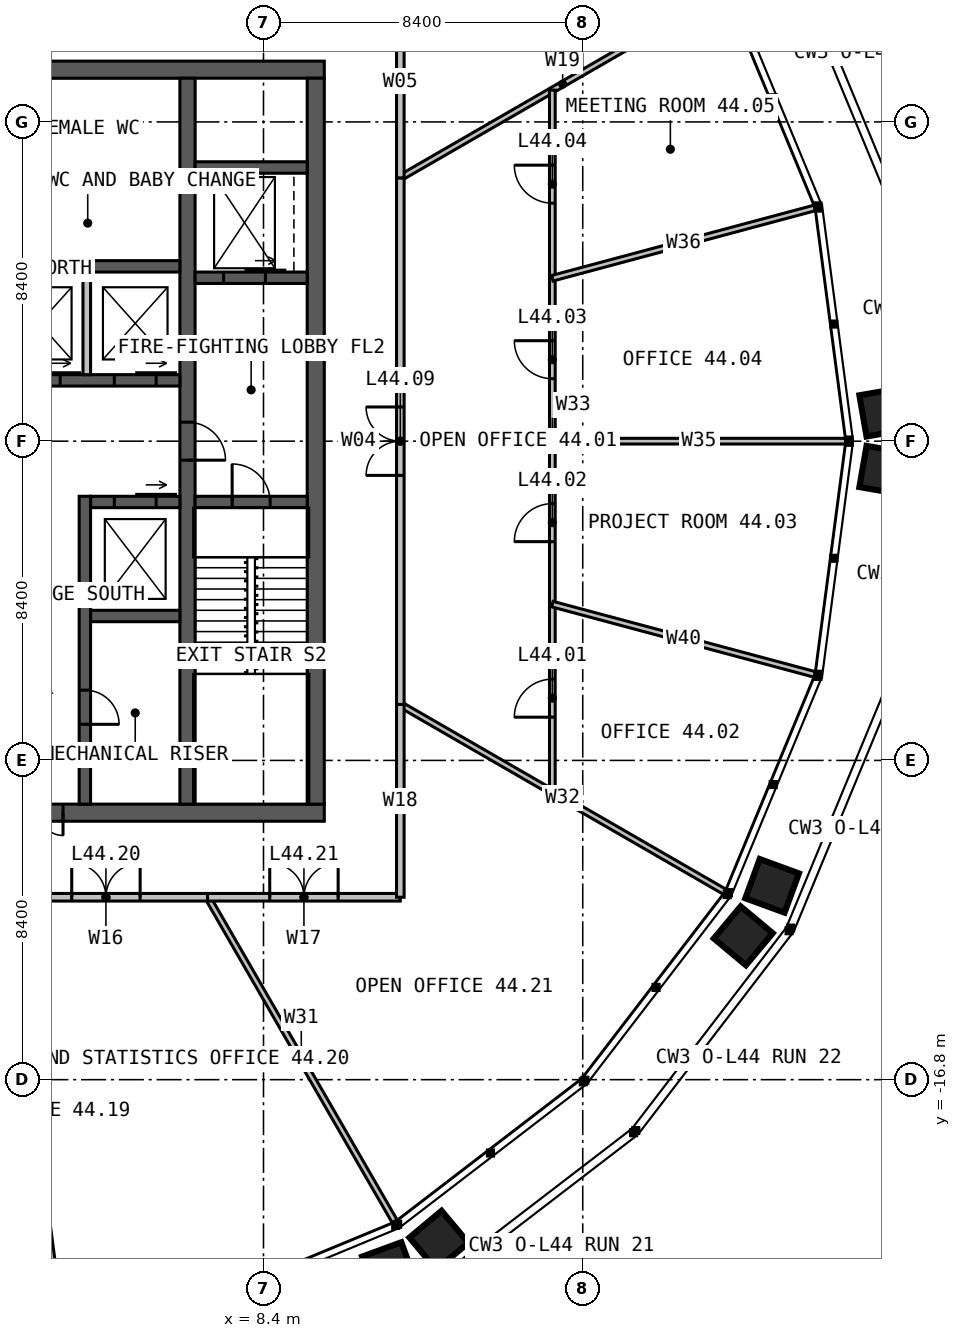
"""IFC4 building model, lengths in metres.
Left out: names, types, materials, properties, quantities, classifications, styles, units other than length and angle.
Written with IfcOpenShell. Run it as: python <this file> out.ifc"""

import sys

from ifc_helpers import new_model, si_unit, direction, frame, frame_2d, origin, place, context, subcontext, project, spatial, rectangle, extrude, element, fill, save


model = new_model("IFC4")
c1 = context("Model", 3, precision=1e-05, world=origin(), true_north=direction((0.0, 1.0)))
c2 = subcontext(c1, "Body", "Model", "MODEL_VIEW")
j1 = project(units=[si_unit("LENGTHUNIT", "METRE"), si_unit("PLANEANGLEUNIT", "RADIAN")], contexts=[c1])
p1 = place(None, origin())
s1 = spatial("IfcSite", under=j1, at=p1, CompositionType="ELEMENT")
p2 = place(p1, origin())
s2 = spatial("IfcBuilding", under=s1, at=p2, CompositionType="ELEMENT")
p3 = place(p2, frame((0.0, 0.0, 183.0)))
s3 = spatial("IfcBuildingStorey", under=s2, at=p3, CompositionType="ELEMENT", Elevation=183.0)
p4 = place(p3, frame((-10.0, 9.775, 0.0), z_axis=(0.0, 0.0, 1.0), x_axis=(1.0, 0.0, 0.0)))
e1 = element("IfcWall", 1, at=p4, inside=s3, PredefinedType="SOLIDWALL", context=c2, shape_type="SweptSolid", body=[
    extrude(rectangle(XDim=20.0, YDim=0.45, at=frame_2d((10.0, 0.0))), origin(), (0.0, 0.0, 1.0), 4.0),
])
p5 = place(p4, frame((9.4, 0.0, 0.0)))
e2 = element("IfcOpeningElement", 2, at=p5, cuts=e1, PredefinedType="OPENING", context=c2, shape_type="SweptSolid", body=[
    extrude(rectangle(XDim=1.2, YDim=2.2, at=frame_2d((0.6, 1.1))), frame((0.0, 0.235, 0.0), z_axis=(0.0, -1.0, 0.0), x_axis=(1.0, 0.0, 0.0)), (0.0, 0.0, 1.0), 0.47),
])
p6 = place(p3, frame((10.0, -9.775, 0.0), z_axis=(0.0, 0.0, 1.0), x_axis=(-1.0, 0.0, 0.0)))
e3 = element("IfcWall", 3, at=p6, inside=s3, PredefinedType="SOLIDWALL", context=c2, shape_type="SweptSolid", body=[
    extrude(rectangle(XDim=20.0, YDim=0.45, at=frame_2d((10.0, 0.0))), origin(), (0.0, 0.0, 1.0), 4.0),
])
p7 = place(p6, frame((6.875, 0.0, 0.0)))
e4 = element("IfcOpeningElement", 4, at=p7, cuts=e3, PredefinedType="OPENING", context=c2, shape_type="SweptSolid", body=[
    extrude(rectangle(XDim=1.2, YDim=2.2, at=frame_2d((0.6, 1.1))), frame((0.0, 0.235, 0.0), z_axis=(0.0, -1.0, 0.0), x_axis=(1.0, 0.0, 0.0)), (0.0, 0.0, 1.0), 0.47),
])
p8 = place(p3, frame((9.775, -9.55, 0.0), z_axis=(0.0, 0.0, 1.0), x_axis=(0.0, 1.0, 0.0)))
e5 = element("IfcWall", 5, at=p8, inside=s3, PredefinedType="SOLIDWALL", context=c2, shape_type="SweptSolid", body=[
    extrude(rectangle(XDim=19.1, YDim=0.45, at=frame_2d((9.55, 0.0))), origin(), (0.0, 0.0, 1.0), 4.0),
])
p9 = place(p3, frame((6.4, 9.55, 0.0), z_axis=(0.0, 0.0, 1.0), x_axis=(0.0, -1.0, 0.0)))
e6 = element("IfcWall", 6, at=p9, inside=s3, PredefinedType="SOLIDWALL", context=c2, shape_type="SweptSolid", body=[
    extrude(rectangle(XDim=19.1, YDim=0.4, at=frame_2d((9.55, 0.0))), origin(), (0.0, 0.0, 1.0), 4.0),
])
p10 = place(p9, frame((9.05, 0.0, 0.0)))
e7 = element("IfcOpeningElement", 7, at=p10, cuts=e6, PredefinedType="OPENING", context=c2, shape_type="SweptSolid", body=[
    extrude(rectangle(XDim=1.0, YDim=2.2, at=frame_2d((0.5, 1.1))), frame((0.0, 0.21, 0.0), z_axis=(0.0, -1.0, 0.0), x_axis=(1.0, 0.0, 0.0)), (0.0, 0.0, 1.0), 0.42),
])
p11 = place(p3, frame((1.35, 1.6, 0.0), z_axis=(0.0, 0.0, 1.0), x_axis=(1.0, 0.0, 0.0)))
e8 = element("IfcWall", 8, at=p11, inside=s3, PredefinedType="SOLIDWALL", context=c2, shape_type="SweptSolid", body=[
    extrude(rectangle(XDim=4.85, YDim=0.3, at=frame_2d((2.425, 0.0))), origin(), (0.0, 0.0, 1.0), 4.0),
])
p12 = place(p11, frame((0.6, 0.0, 0.0)))
e9 = element("IfcOpeningElement", 9, at=p12, cuts=e8, PredefinedType="OPENING", context=c2, shape_type="SweptSolid", body=[
    extrude(rectangle(XDim=1.1, YDim=2.2, at=frame_2d((0.55, 1.1))), frame((0.0, 0.16, 0.0), z_axis=(0.0, -1.0, 0.0), x_axis=(1.0, 0.0, 0.0)), (0.0, 0.0, 1.0), 0.32),
])
p13 = place(p11, frame((3.125, 0.0, 0.0)))
e10 = element("IfcOpeningElement", 10, at=p13, cuts=e8, PredefinedType="OPENING", context=c2, shape_type="SweptSolid", body=[
    extrude(rectangle(XDim=1.1, YDim=2.2, at=frame_2d((0.55, 1.1))), frame((0.0, 0.16, 0.0), z_axis=(0.0, -1.0, 0.0), x_axis=(1.0, 0.0, 0.0)), (0.0, 0.0, 1.0), 0.32),
])
p14 = place(p3, frame((1.35, 4.6, 0.0), z_axis=(0.0, 0.0, 1.0), x_axis=(1.0, 0.0, 0.0)))
e11 = element("IfcWall", 11, at=p14, inside=s3, PredefinedType="SOLIDWALL", context=c2, shape_type="SweptSolid", body=[
    extrude(rectangle(XDim=4.85, YDim=0.3, at=frame_2d((2.425, 0.0))), origin(), (0.0, 0.0, 1.0), 4.0),
])
p15 = place(p3, frame((3.85, -1.6, 0.0), z_axis=(0.0, 0.0, 1.0), x_axis=(1.0, 0.0, 0.0)))
e12 = element("IfcWall", 12, at=p15, inside=s3, PredefinedType="SOLIDWALL", context=c2, shape_type="SweptSolid", body=[
    extrude(rectangle(XDim=2.35, YDim=0.3, at=frame_2d((1.175, 0.0))), origin(), (0.0, 0.0, 1.0), 4.0),
])
p16 = place(p15, frame((0.625, 0.0, 0.0)))
e13 = element("IfcOpeningElement", 13, at=p16, cuts=e12, PredefinedType="OPENING", context=c2, shape_type="SweptSolid", body=[
    extrude(rectangle(XDim=1.1, YDim=2.2, at=frame_2d((0.55, 1.1))), frame((0.0, 0.16, 0.0), z_axis=(0.0, -1.0, 0.0), x_axis=(1.0, 0.0, 0.0)), (0.0, 0.0, 1.0), 0.32),
])
p17 = place(p3, frame((3.85, -4.6, 0.0), z_axis=(0.0, 0.0, 1.0), x_axis=(1.0, 0.0, 0.0)))
e14 = element("IfcWall", 14, at=p17, inside=s3, PredefinedType="SOLIDWALL", context=c2, shape_type="SweptSolid", body=[
    extrude(rectangle(XDim=2.35, YDim=0.3, at=frame_2d((1.175, 0.0))), origin(), (0.0, 0.0, 1.0), 4.0),
])
p18 = place(p3, frame((3.7, -1.45, 0.0), z_axis=(0.0, 0.0, 1.0), x_axis=(0.0, -1.0, 0.0)))
e15 = element("IfcWall", 15, at=p18, inside=s3, PredefinedType="SOLIDWALL", context=c2, shape_type="SweptSolid", body=[
    extrude(rectangle(XDim=8.1, YDim=0.3, at=frame_2d((4.05, 0.0))), origin(), (0.0, 0.0, 1.0), 4.0),
])
p19 = place(p18, frame((5.1, 0.0, 0.0)))
e16 = element("IfcOpeningElement", 16, at=p19, cuts=e15, PredefinedType="OPENING", context=c2, shape_type="SweptSolid", body=[
    extrude(rectangle(XDim=0.9, YDim=2.2, at=frame_2d((0.45, 1.1))), frame((0.0, 0.16, 0.0), z_axis=(0.0, -1.0, 0.0), x_axis=(1.0, 0.0, 0.0)), (0.0, 0.0, 1.0), 0.32),
])
p20 = place(p3, frame((6.6, -1.6, 0.0), z_axis=(0.0, 0.0, 1.0), x_axis=(1.0, 0.0, 0.0)))
e17 = element("IfcWall", 17, at=p20, inside=s3, PredefinedType="SOLIDWALL", context=c2, shape_type="SweptSolid", body=[
    extrude(rectangle(XDim=2.95, YDim=0.3, at=frame_2d((1.475, 0.0))), origin(), (0.0, 0.0, 1.0), 4.0),
])
p21 = place(p20, frame((0.975, 0.0, 0.0)))
e18 = element("IfcOpeningElement", 18, at=p21, cuts=e17, PredefinedType="OPENING", context=c2, shape_type="SweptSolid", body=[
    extrude(rectangle(XDim=1.0, YDim=2.2, at=frame_2d((0.5, 1.1))), frame((0.0, 0.16, 0.0), z_axis=(0.0, -1.0, 0.0), x_axis=(1.0, 0.0, 0.0)), (0.0, 0.0, 1.0), 0.32),
])
p22 = place(p3, frame((6.6, 4.3, 0.0), z_axis=(0.0, 0.0, 1.0), x_axis=(1.0, 0.0, 0.0)))
e19 = element("IfcWall", 19, at=p22, inside=s3, PredefinedType="SOLIDWALL", context=c2, shape_type="SweptSolid", body=[
    extrude(rectangle(XDim=2.95, YDim=0.3, at=frame_2d((1.475, 0.0))), origin(), (0.0, 0.0, 1.0), 4.0),
])
p23 = place(p22, frame((0.75, 0.0, 0.0)))
e20 = element("IfcOpeningElement", 20, at=p23, cuts=e19, PredefinedType="OPENING", context=c2, shape_type="SweptSolid", body=[
    extrude(rectangle(XDim=1.1, YDim=2.2, at=frame_2d((0.55, 1.1))), frame((0.0, 0.16, 0.0), z_axis=(0.0, -1.0, 0.0), x_axis=(1.0, 0.0, 0.0)), (0.0, 0.0, 1.0), 0.32),
])
p24 = place(p3, frame((6.6, 7.2, 0.0), z_axis=(0.0, 0.0, 1.0), x_axis=(1.0, 0.0, 0.0)))
e21 = element("IfcWall", 21, at=p24, inside=s3, PredefinedType="SOLIDWALL", context=c2, shape_type="SweptSolid", body=[
    extrude(rectangle(XDim=2.95, YDim=0.3, at=frame_2d((1.475, 0.0))), origin(), (0.0, 0.0, 1.0), 4.0),
])
p25 = place(p3, frame((3.75, 1.75, 0.0), z_axis=(0.0, 0.0, 1.0), x_axis=(0.0, 1.0, 0.0)))
e22 = element("IfcWall", 22, at=p25, inside=s3, PredefinedType="SOLIDWALL", context=c2, shape_type="SweptSolid", body=[
    extrude(rectangle(XDim=2.7, YDim=0.2, at=frame_2d((1.35, 0.0))), origin(), (0.0, 0.0, 1.0), 3.75),
])
p26 = place(p3, frame((1.35, 6.8, 0.0), z_axis=(0.0, 0.0, 1.0), x_axis=(1.0, 0.0, 0.0)))
e23 = element("IfcWall", 23, at=p26, inside=s3, PredefinedType="PARTITIONING", context=c2, shape_type="SweptSolid", body=[
    extrude(rectangle(XDim=4.85, YDim=0.15, at=frame_2d((2.425, 0.0))), origin(), (0.0, 0.0, 1.0), 3.75),
])
for number, where, z_axis, x_axis in (
    (24, (12.0, -6.928, 0.0), (0.0, 0.0, 1.0), (0.866, -0.5, 0.0)),
    (25, (12.0, 6.928, 0.0), (0.0, 0.0, 1.0), (0.866, 0.5, 0.0)),
):
    element("IfcWall", number, at=place(p3, frame(where, z_axis=z_axis, x_axis=x_axis)), inside=s3, PredefinedType="PARTITIONING", context=c2, shape_type="SweptSolid", body=[
        extrude(rectangle(XDim=9.865, YDim=0.15, at=frame_2d((4.932, 0.0))), origin(), (0.0, 0.0, 1.0), 2.79),
    ])
p27 = place(p3, frame((1.58, -12.0, 0.0), z_axis=(0.0, 0.0, 1.0), x_axis=(0.130531416064, -0.991444173628, 0.0)))
e26 = element("IfcWall", 26, at=p27, inside=s3, PredefinedType="PARTITIONING", context=c2, shape_type="SweptSolid", body=[
    extrude(rectangle(XDim=11.415, YDim=0.15, at=frame_2d((5.708, 0.0))), origin(), (0.0, 0.0, 1.0), 2.79),
])
p28 = place(p3, frame((6.928, -12.0, 0.0), z_axis=(0.0, 0.0, 1.0), x_axis=(0.49999595416, -0.866027739639, 0.0)))
e27 = element("IfcWall", 27, at=p28, inside=s3, PredefinedType="PARTITIONING", context=c2, shape_type="SweptSolid", body=[
    extrude(rectangle(XDim=9.865, YDim=0.15, at=frame_2d((4.932, 0.0))), origin(), (0.0, 0.0, 1.0), 2.79),
])
p29 = place(p3, frame((16.0, -9.238, 0.0), z_axis=(0.0, 0.0, 1.0), x_axis=(0.0, 1.0, 0.0)))
e28 = element("IfcWall", 28, at=p29, inside=s3, PredefinedType="PARTITIONING", context=c2, shape_type="SweptSolid", body=[
    extrude(rectangle(XDim=18.475, YDim=0.15, at=frame_2d((9.238, 0.0))), origin(), (0.0, 0.0, 1.0), 2.79),
])
p30 = place(p29, frame((1.975, 0.0, 0.0)))
e29 = element("IfcOpeningElement", 29, at=p30, cuts=e28, PredefinedType="OPENING", context=c2, shape_type="SweptSolid", body=[
    extrude(rectangle(XDim=1.0, YDim=2.2, at=frame_2d((0.5, 1.1))), frame((0.0, 0.085, 0.0), z_axis=(0.0, -1.0, 0.0), x_axis=(1.0, 0.0, 0.0)), (0.0, 0.0, 1.0), 0.17),
])
p31 = place(p29, frame((6.594, 0.0, 0.0)))
e30 = element("IfcOpeningElement", 30, at=p31, cuts=e28, PredefinedType="OPENING", context=c2, shape_type="SweptSolid", body=[
    extrude(rectangle(XDim=1.0, YDim=2.2, at=frame_2d((0.5, 1.1))), frame((0.0, 0.085, 0.0), z_axis=(0.0, -1.0, 0.0), x_axis=(1.0, 0.0, 0.0)), (0.0, 0.0, 1.0), 0.17),
])
p32 = place(p29, frame((10.881, 0.0, 0.0)))
e31 = element("IfcOpeningElement", 31, at=p32, cuts=e28, PredefinedType="OPENING", context=c2, shape_type="SweptSolid", body=[
    extrude(rectangle(XDim=1.0, YDim=2.2, at=frame_2d((0.5, 1.1))), frame((0.0, 0.085, 0.0), z_axis=(0.0, -1.0, 0.0), x_axis=(1.0, 0.0, 0.0)), (0.0, 0.0, 1.0), 0.17),
])
p33 = place(p29, frame((15.5, 0.0, 0.0)))
e32 = element("IfcOpeningElement", 32, at=p33, cuts=e28, PredefinedType="OPENING", context=c2, shape_type="SweptSolid", body=[
    extrude(rectangle(XDim=1.0, YDim=2.2, at=frame_2d((0.5, 1.1))), frame((0.0, 0.085, 0.0), z_axis=(0.0, -1.0, 0.0), x_axis=(1.0, 0.0, 0.0)), (0.0, 0.0, 1.0), 0.17),
])
p34 = place(p3, frame((16.0, -4.287, 0.0), z_axis=(0.0, 0.0, 1.0), x_axis=(0.965925667522, -0.25881963763, 0.0)))
e33 = element("IfcWall", 33, at=p34, inside=s3, PredefinedType="PARTITIONING", context=c2, shape_type="SweptSolid", body=[
    extrude(rectangle(XDim=7.157, YDim=0.15, at=frame_2d((3.578, 0.0))), origin(), (0.0, 0.0, 1.0), 2.79),
])
p35 = place(p3, frame((16.0, 0.0, 0.0), z_axis=(0.0, 0.0, 1.0), x_axis=(1.0, 0.0, 0.0)))
e34 = element("IfcWall", 34, at=p35, inside=s3, PredefinedType="PARTITIONING", context=c2, shape_type="SweptSolid", body=[
    extrude(rectangle(XDim=7.721, YDim=0.15, at=frame_2d((3.861, 0.0))), origin(), (0.0, 0.0, 1.0), 2.79),
])
p36 = place(p3, frame((16.0, 4.287, 0.0), z_axis=(0.0, 0.0, 1.0), x_axis=(0.965925667522, 0.25881963763, 0.0)))
e35 = element("IfcWall", 35, at=p36, inside=s3, PredefinedType="PARTITIONING", context=c2, shape_type="SweptSolid", body=[
    extrude(rectangle(XDim=7.157, YDim=0.15, at=frame_2d((3.578, 0.0))), origin(), (0.0, 0.0, 1.0), 2.79),
])
p37 = place(p3, frame((12.0, -6.928, 0.0), z_axis=(0.0, 0.0, 1.0), x_axis=(0.0, 1.0, 0.0)))
e36 = element("IfcWall", 36, at=p37, inside=s3, PredefinedType="PARTITIONING", context=c2, shape_type="SweptSolid", body=[
    extrude(rectangle(XDim=13.856, YDim=0.2, at=frame_2d((6.928, 0.0))), origin(), (0.0, 0.0, 1.0), 3.8),
])
p38 = place(p37, frame((6.028, 0.0, 0.0)))
e37 = element("IfcOpeningElement", 37, at=p38, cuts=e36, PredefinedType="OPENING", context=c2, shape_type="SweptSolid", body=[
    extrude(rectangle(XDim=1.8, YDim=2.2, at=frame_2d((0.9, 1.1))), frame((0.0, 0.11, 0.0), z_axis=(0.0, -1.0, 0.0), x_axis=(1.0, 0.0, 0.0)), (0.0, 0.0, 1.0), 0.22),
])
p39 = place(p3, frame((12.0, 6.928, 0.0), z_axis=(0.0, 0.0, 1.0), x_axis=(0.0, 1.0, 0.0)))
e38 = element("IfcWall", 38, at=p39, inside=s3, PredefinedType="PARTITIONING", context=c2, shape_type="SweptSolid", body=[
    extrude(rectangle(XDim=5.072, YDim=0.2, at=frame_2d((2.536, 0.0))), origin(), (0.0, 0.0, 1.0), 3.8),
])
p40 = place(p3, frame((1.58, -12.0, 0.0), z_axis=(0.0, 0.0, 1.0), x_axis=(1.0, 0.0, 0.0)))
e39 = element("IfcWall", 39, at=p40, inside=s3, PredefinedType="PARTITIONING", context=c2, shape_type="SweptSolid", body=[
    extrude(rectangle(XDim=5.348, YDim=0.2, at=frame_2d((2.674, 0.0))), origin(), (0.0, 0.0, 1.0), 3.8),
])
p41 = place(p40, frame((1.774, 0.0, 0.0)))
e40 = element("IfcOpeningElement", 40, at=p41, cuts=e39, PredefinedType="OPENING", context=c2, shape_type="SweptSolid", body=[
    extrude(rectangle(XDim=1.8, YDim=2.2, at=frame_2d((0.9, 1.1))), frame((0.0, 0.11, 0.0), z_axis=(0.0, -1.0, 0.0), x_axis=(1.0, 0.0, 0.0)), (0.0, 0.0, 1.0), 0.22),
])
p42 = place(p3, frame((6.928, -12.0, 0.0), z_axis=(0.0, 0.0, 1.0), x_axis=(1.0, 0.0, 0.0)))
e41 = element("IfcWall", 41, at=p42, inside=s3, PredefinedType="PARTITIONING", context=c2, shape_type="SweptSolid", body=[
    extrude(rectangle(XDim=5.072, YDim=0.2, at=frame_2d((2.536, 0.0))), origin(), (0.0, 0.0, 1.0), 3.8),
])
p43 = place(p42, frame((1.636, 0.0, 0.0)))
e42 = element("IfcOpeningElement", 42, at=p43, cuts=e41, PredefinedType="OPENING", context=c2, shape_type="SweptSolid", body=[
    extrude(rectangle(XDim=1.8, YDim=2.2, at=frame_2d((0.9, 1.1))), frame((0.0, 0.11, 0.0), z_axis=(0.0, -1.0, 0.0), x_axis=(1.0, 0.0, 0.0)), (0.0, 0.0, 1.0), 0.22),
])
p44 = place(p3, frame((12.0, -12.0, 0.0), z_axis=(0.0, 0.0, 1.0), x_axis=(0.0, 1.0, 0.0)))
e43 = element("IfcWall", 43, at=p44, inside=s3, PredefinedType="PARTITIONING", context=c2, shape_type="SweptSolid", body=[
    extrude(rectangle(XDim=5.072, YDim=0.2, at=frame_2d((2.536, 0.0))), origin(), (0.0, 0.0, 1.0), 3.8),
])
p45 = place(p7, origin())
e44 = element("IfcDoor", 44, at=p45, inside=s3, OperationType="DOUBLE_DOOR_SINGLE_SWING", PredefinedType="DOOR", context=c2, shape_type="SweptSolid", body=[
    extrude(rectangle(XDim=1.2, YDim=2.2, at=frame_2d((0.6, 1.1))), frame((0.0, 0.025, 0.0), z_axis=(0.0, -1.0, 0.0), x_axis=(1.0, 0.0, 0.0)), (0.0, 0.0, 1.0), 0.05),
])
fill(e4, e44)
p46 = place(p10, origin())
e45 = element("IfcDoor", 45, at=p46, inside=s3, OperationType="SINGLE_SWING_RIGHT", PredefinedType="DOOR", context=c2, shape_type="SweptSolid", body=[
    extrude(rectangle(XDim=1.0, YDim=2.2, at=frame_2d((0.5, 1.1))), frame((0.0, 0.025, 0.0), z_axis=(0.0, -1.0, 0.0), x_axis=(1.0, 0.0, 0.0)), (0.0, 0.0, 1.0), 0.05),
])
fill(e7, e45)
p47 = place(p21, origin())
e46 = element("IfcDoor", 46, at=p47, inside=s3, OperationType="SINGLE_SWING_LEFT", PredefinedType="DOOR", context=c2, shape_type="SweptSolid", body=[
    extrude(rectangle(XDim=1.0, YDim=2.2, at=frame_2d((0.5, 1.1))), frame((0.0, 0.025, 0.0), z_axis=(0.0, -1.0, 0.0), x_axis=(1.0, 0.0, 0.0)), (0.0, 0.0, 1.0), 0.05),
])
fill(e18, e46)
p48 = place(p19, origin())
e47 = element("IfcDoor", 47, at=p48, inside=s3, OperationType="SINGLE_SWING_RIGHT", PredefinedType="DOOR", context=c2, shape_type="SweptSolid", body=[
    extrude(rectangle(XDim=0.9, YDim=2.2, at=frame_2d((0.45, 1.1))), frame((0.0, 0.025, 0.0), z_axis=(0.0, -1.0, 0.0), x_axis=(1.0, 0.0, 0.0)), (0.0, 0.0, 1.0), 0.05),
])
fill(e16, e47)
p49 = place(p12, origin())
e48 = element("IfcDoor", 48, at=p49, inside=s3, OperationType="SLIDING_TO_LEFT", PredefinedType="DOOR", context=c2, shape_type="SweptSolid", body=[
    extrude(rectangle(XDim=1.1, YDim=2.2, at=frame_2d((0.55, 1.1))), frame((0.0, 0.025, 0.0), z_axis=(0.0, -1.0, 0.0), x_axis=(1.0, 0.0, 0.0)), (0.0, 0.0, 1.0), 0.05),
])
fill(e9, e48)
p50 = place(p13, origin())
e49 = element("IfcDoor", 49, at=p50, inside=s3, OperationType="SLIDING_TO_LEFT", PredefinedType="DOOR", context=c2, shape_type="SweptSolid", body=[
    extrude(rectangle(XDim=1.1, YDim=2.2, at=frame_2d((0.55, 1.1))), frame((0.0, 0.025, 0.0), z_axis=(0.0, -1.0, 0.0), x_axis=(1.0, 0.0, 0.0)), (0.0, 0.0, 1.0), 0.05),
])
fill(e10, e49)
p51 = place(p16, origin())
e50 = element("IfcDoor", 50, at=p51, inside=s3, OperationType="SLIDING_TO_LEFT", PredefinedType="DOOR", context=c2, shape_type="SweptSolid", body=[
    extrude(rectangle(XDim=1.1, YDim=2.2, at=frame_2d((0.55, 1.1))), frame((0.0, 0.025, 0.0), z_axis=(0.0, -1.0, 0.0), x_axis=(1.0, 0.0, 0.0)), (0.0, 0.0, 1.0), 0.05),
])
fill(e13, e50)
p52 = place(p23, origin())
e51 = element("IfcDoor", 51, at=p52, inside=s3, OperationType="SLIDING_TO_LEFT", PredefinedType="DOOR", context=c2, shape_type="SweptSolid", body=[
    extrude(rectangle(XDim=1.1, YDim=2.2, at=frame_2d((0.55, 1.1))), frame((0.0, 0.025, 0.0), z_axis=(0.0, -1.0, 0.0), x_axis=(1.0, 0.0, 0.0)), (0.0, 0.0, 1.0), 0.05),
])
fill(e20, e51)
p53 = place(p30, origin())
e52 = element("IfcDoor", 52, at=p53, inside=s3, OperationType="SINGLE_SWING_LEFT", PredefinedType="DOOR", context=c2, shape_type="SweptSolid", body=[
    extrude(rectangle(XDim=1.0, YDim=2.2, at=frame_2d((0.5, 1.1))), frame((0.0, 0.025, 0.0), z_axis=(0.0, -1.0, 0.0), x_axis=(1.0, 0.0, 0.0)), (0.0, 0.0, 1.0), 0.05),
])
fill(e29, e52)
p54 = place(p31, origin())
e53 = element("IfcDoor", 53, at=p54, inside=s3, OperationType="SINGLE_SWING_LEFT", PredefinedType="DOOR", context=c2, shape_type="SweptSolid", body=[
    extrude(rectangle(XDim=1.0, YDim=2.2, at=frame_2d((0.5, 1.1))), frame((0.0, 0.025, 0.0), z_axis=(0.0, -1.0, 0.0), x_axis=(1.0, 0.0, 0.0)), (0.0, 0.0, 1.0), 0.05),
])
fill(e30, e53)
p55 = place(p32, origin())
e54 = element("IfcDoor", 54, at=p55, inside=s3, OperationType="SINGLE_SWING_RIGHT", PredefinedType="DOOR", context=c2, shape_type="SweptSolid", body=[
    extrude(rectangle(XDim=1.0, YDim=2.2, at=frame_2d((0.5, 1.1))), frame((0.0, 0.025, 0.0), z_axis=(0.0, -1.0, 0.0), x_axis=(1.0, 0.0, 0.0)), (0.0, 0.0, 1.0), 0.05),
])
fill(e31, e54)
p56 = place(p33, origin())
e55 = element("IfcDoor", 55, at=p56, inside=s3, OperationType="SINGLE_SWING_RIGHT", PredefinedType="DOOR", context=c2, shape_type="SweptSolid", body=[
    extrude(rectangle(XDim=1.0, YDim=2.2, at=frame_2d((0.5, 1.1))), frame((0.0, 0.025, 0.0), z_axis=(0.0, -1.0, 0.0), x_axis=(1.0, 0.0, 0.0)), (0.0, 0.0, 1.0), 0.05),
])
fill(e32, e55)
p57 = place(p38, origin())
e56 = element("IfcDoor", 56, at=p57, inside=s3, OperationType="DOUBLE_DOOR_SINGLE_SWING", PredefinedType="DOOR", context=c2, shape_type="SweptSolid", body=[
    extrude(rectangle(XDim=1.8, YDim=2.2, at=frame_2d((0.9, 1.1))), frame((0.0, 0.025, 0.0), z_axis=(0.0, -1.0, 0.0), x_axis=(1.0, 0.0, 0.0)), (0.0, 0.0, 1.0), 0.05),
])
fill(e37, e56)
p58 = place(p41, origin())
e57 = element("IfcDoor", 57, at=p58, inside=s3, OperationType="DOUBLE_DOOR_SINGLE_SWING", PredefinedType="DOOR", context=c2, shape_type="SweptSolid", body=[
    extrude(rectangle(XDim=1.8, YDim=2.2, at=frame_2d((0.9, 1.1))), frame((0.0, 0.025, 0.0), z_axis=(0.0, -1.0, 0.0), x_axis=(1.0, 0.0, 0.0)), (0.0, 0.0, 1.0), 0.05),
])
fill(e40, e57)
p59 = place(p43, origin())
e58 = element("IfcDoor", 58, at=p59, inside=s3, OperationType="DOUBLE_DOOR_SINGLE_SWING", PredefinedType="DOOR", context=c2, shape_type="SweptSolid", body=[
    extrude(rectangle(XDim=1.8, YDim=2.2, at=frame_2d((0.9, 1.1))), frame((0.0, 0.025, 0.0), z_axis=(0.0, -1.0, 0.0), x_axis=(1.0, 0.0, 0.0)), (0.0, 0.0, 1.0), 0.05),
])
fill(e42, e58)
save(model, sys.argv[1])
